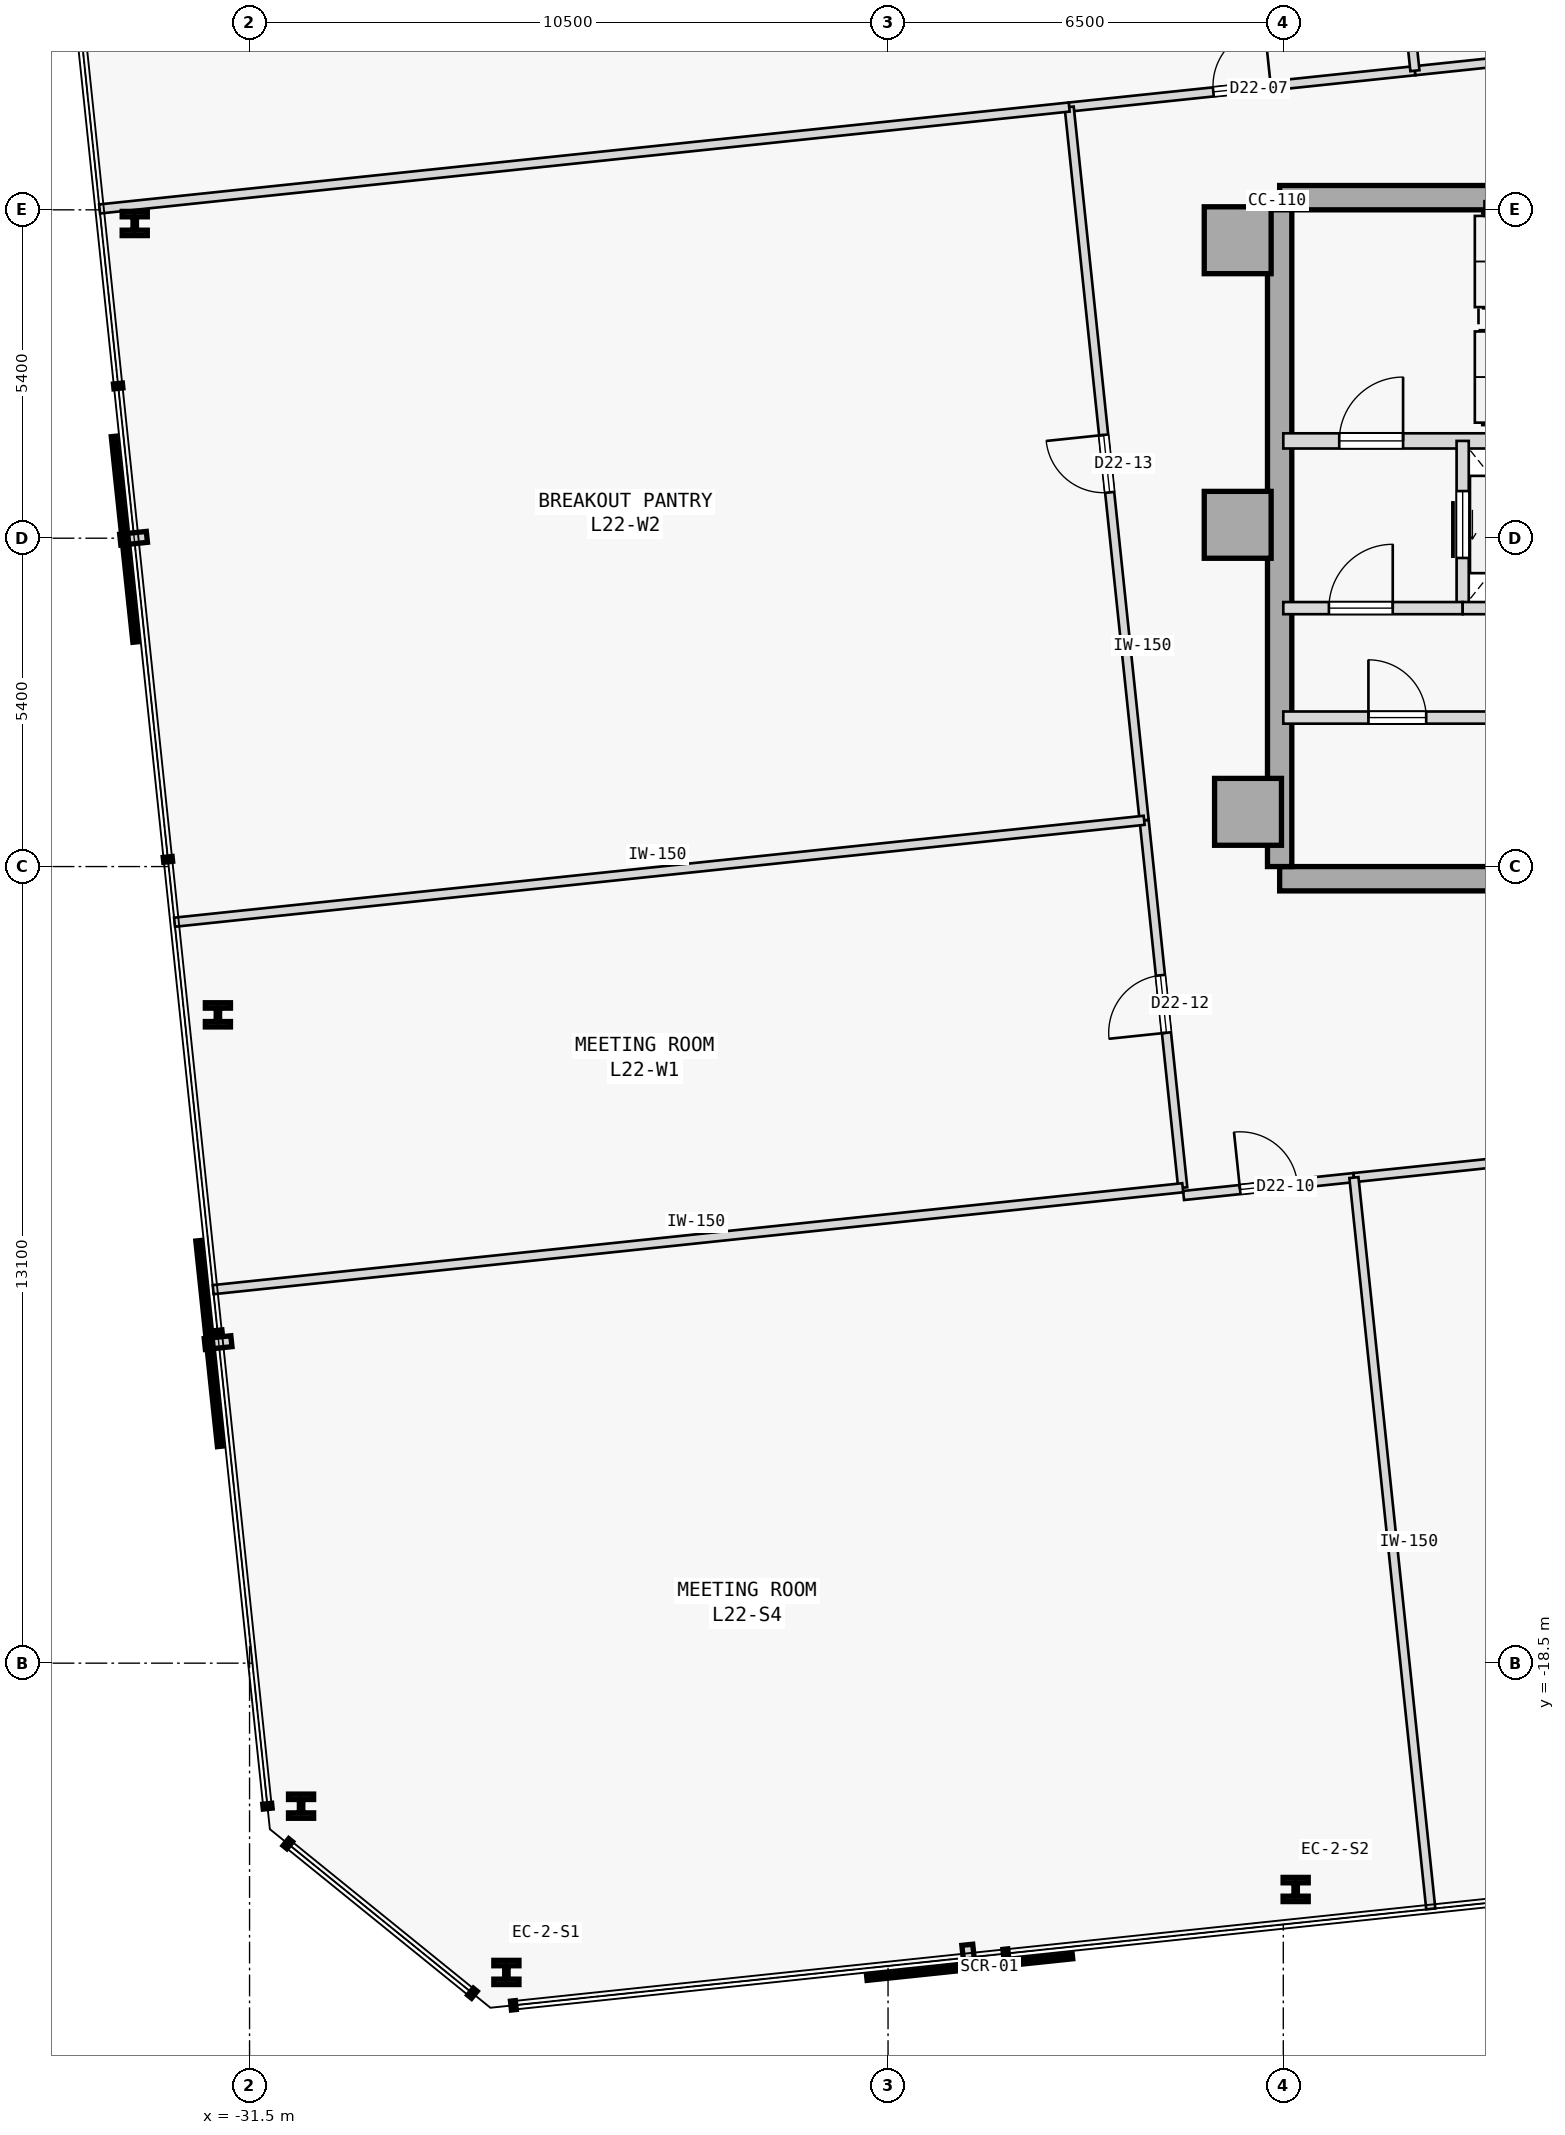
"""IFC4 building model, lengths in metres.
Left out: names, types, materials, properties, quantities, classifications, styles, units other than length and angle.
Written with IfcOpenShell. Run it as: python <this file> out.ifc"""

import sys

from ifc_helpers import new_model, si_unit, direction, frame, frame_2d, origin, origin_2d, place, context, subcontext, project, spatial, rectangle, i_section, extrude, element, fill, save


model = new_model("IFC4")
c1 = context("Model", 3, precision=1e-05, world=origin(), true_north=direction((0.0, 1.0)))
c2 = subcontext(c1, "Body", "Model", "MODEL_VIEW")
j1 = project(units=[si_unit("LENGTHUNIT", "METRE"), si_unit("PLANEANGLEUNIT", "RADIAN")], contexts=[c1])
p1 = place(None, origin())
s1 = spatial("IfcSite", under=j1, at=p1, CompositionType="ELEMENT")
p2 = place(p1, origin())
s2 = spatial("IfcBuilding", under=s1, at=p2, CompositionType="ELEMENT")
p3 = place(p2, frame((0.0, 0.0, 91.1)))
s3 = spatial("IfcBuildingStorey", under=s2, at=p3, CompositionType="ELEMENT", Elevation=91.1)
for number, where, z_axis, x_axis in (
    (1, (-15.25, 4.9, 0.0), (0.0, 0.0, 1.0), (1.0, 0.0, 0.0)),
    (2, (-15.25, 0.22, 0.0), (0.0, 0.0, 1.0), (1.0, 0.0, 0.0)),
    (3, (-15.08, -4.5, 0.0), (0.0, 0.0, 1.0), (1.0, 0.0, 0.0)),
):
    element("IfcColumn", number, at=place(p3, frame(where, z_axis=z_axis, x_axis=x_axis)), inside=s3, PredefinedType="COLUMN", context=c2, shape_type="SweptSolid", body=[
        extrude(rectangle(XDim=1.1, YDim=1.1, at=origin_2d()), origin(), (0.0, 0.0, 1.0), 3.7),
    ])
p4 = place(p3, frame((-14.56, 5.6, 0.0), z_axis=(0.0, 0.0, 1.0), x_axis=(1.0, 0.0, 0.0)))
e4 = element("IfcWall", 4, at=p4, inside=s3, PredefinedType="SHEAR", context=c2, shape_type="SweptSolid", body=[
    extrude(rectangle(XDim=11.41, YDim=0.4, at=frame_2d((5.705, 0.0))), origin(), (0.0, 0.0, 1.0), 3.475),
])
p5 = place(p3, frame((-14.56, -5.6, 0.0), z_axis=(0.0, 0.0, 1.0), x_axis=(1.0, 0.0, 0.0)))
e5 = element("IfcWall", 5, at=p5, inside=s3, PredefinedType="SHEAR", context=c2, shape_type="SweptSolid", body=[
    extrude(rectangle(XDim=10.86, YDim=0.4, at=frame_2d((5.43, 0.0))), origin(), (0.0, 0.0, 1.0), 3.475),
])
p6 = place(p3, frame((-14.56, -5.4, 0.0), z_axis=(0.0, 0.0, 1.0), x_axis=(0.0, 1.0, 0.0)))
e6 = element("IfcWall", 6, at=p6, inside=s3, PredefinedType="SHEAR", context=c2, shape_type="SweptSolid", body=[
    extrude(rectangle(XDim=10.8, YDim=0.4, at=frame_2d((5.4, 0.0))), origin(), (0.0, 0.0, 1.0), 3.475),
])
for number, where, z_axis, x_axis in (
    (7, (-27.276, -23.586, 0.0), (0.0, 0.0, 1.0), (1.0, 0.0, 0.0)),
    (8, (-14.297, -22.222, 0.0), (0.0, 0.0, 1.0), (1.0, 0.0, 0.0)),
    (9, (-33.388, 5.175, 0.0), (0.0, 0.0, 1.0), (1.0, 0.0, 0.0)),
    (10, (-32.021, -7.838, 0.0), (0.0, 0.0, 1.0), (1.0, 0.0, 0.0)),
    (11, (-30.653, -20.852, 0.0), (0.0, 0.0, 1.0), (1.0, 0.0, 0.0)),
):
    element("IfcColumn", number, at=place(p3, frame(where, z_axis=z_axis, x_axis=x_axis)), inside=s3, PredefinedType="COLUMN", context=c2, shape_type="SweptSolid", body=[
        extrude(i_section(OverallWidth=0.413, OverallDepth=0.398, WebThickness=0.056, FlangeThickness=0.089, FilletRadius=0.015, at=origin_2d()), origin(), (0.0, 0.0, 1.0), 3.7),
    ])
p7 = place(p3, frame((-14.5, 1.6, 0.0), z_axis=(0.0, 0.0, 1.0), x_axis=(1.0, 0.0, 0.0)))
e12 = element("IfcWall", 12, at=p7, inside=s3, PredefinedType="STANDARD", context=c2, shape_type="SweptSolid", body=[
    extrude(rectangle(XDim=3.6, YDim=0.25, at=frame_2d((1.8, 0.0))), origin(), (0.0, 0.0, 1.0), 3.475),
])
p8 = place(p7, frame((0.92, 0.0, 0.0)))
e13 = element("IfcOpeningElement", 13, at=p8, cuts=e12, PredefinedType="OPENING", context=c2, shape_type="SweptSolid", body=[
    extrude(rectangle(XDim=1.05, YDim=2.15, at=frame_2d((0.525, 1.075))), frame((0.0, 0.135, 0.0), z_axis=(0.0, -1.0, 0.0), x_axis=(1.0, 0.0, 0.0)), (0.0, 0.0, 1.0), 0.27),
])
p9 = place(p3, frame((-11.55, -1.15, 0.0), z_axis=(0.0, 0.0, 1.0), x_axis=(0.0, 1.0, 0.0)))
e14 = element("IfcWall", 14, at=p9, inside=s3, PredefinedType="STANDARD", context=c2, shape_type="SweptSolid", body=[
    extrude(rectangle(XDim=2.75, YDim=0.2, at=frame_2d((1.375, 0.0))), origin(), (0.0, 0.0, 1.0), 3.475),
])
p10 = place(p9, frame((0.825, 0.0, 0.0)))
e15 = element("IfcOpeningElement", 15, at=p10, cuts=e14, PredefinedType="OPENING", context=c2, shape_type="SweptSolid", body=[
    extrude(rectangle(XDim=1.1, YDim=2.15, at=frame_2d((0.55, 1.075))), frame((0.0, 0.11, 0.0), z_axis=(0.0, -1.0, 0.0), x_axis=(1.0, 0.0, 0.0)), (0.0, 0.0, 1.0), 0.22),
])
p11 = place(p3, frame((-14.5, -1.15, 0.0), z_axis=(0.0, 0.0, 1.0), x_axis=(1.0, 0.0, 0.0)))
e16 = element("IfcWall", 16, at=p11, inside=s3, PredefinedType="STANDARD", context=c2, shape_type="SweptSolid", body=[
    extrude(rectangle(XDim=2.95, YDim=0.2, at=frame_2d((1.475, 0.0))), origin(), (0.0, 0.0, 1.0), 3.475),
])
p12 = place(p11, frame((0.75, 0.0, 0.0)))
e17 = element("IfcOpeningElement", 17, at=p12, cuts=e16, PredefinedType="OPENING", context=c2, shape_type="SweptSolid", body=[
    extrude(rectangle(XDim=1.05, YDim=2.18, at=frame_2d((0.525, 1.09))), frame((0.0, 0.11, 0.0), z_axis=(0.0, -1.0, 0.0), x_axis=(1.0, 0.0, 0.0)), (0.0, 0.0, 1.0), 0.22),
])
p13 = place(p3, frame((-11.55, -1.15, 0.0), z_axis=(0.0, 0.0, 1.0), x_axis=(1.0, 0.0, 0.0)))
e18 = element("IfcWall", 18, at=p13, inside=s3, PredefinedType="STANDARD", context=c2, shape_type="SweptSolid", body=[
    extrude(rectangle(XDim=2.2, YDim=0.2, at=frame_2d((1.1, 0.0))), origin(), (0.0, 0.0, 1.0), 3.475),
])
p14 = place(p3, frame((-14.5, -2.95, 0.0), z_axis=(0.0, 0.0, 1.0), x_axis=(1.0, 0.0, 0.0)))
e19 = element("IfcWall", 19, at=p14, inside=s3, PredefinedType="STANDARD", context=c2, shape_type="SweptSolid", body=[
    extrude(rectangle(XDim=10.8, YDim=0.2, at=frame_2d((5.4, 0.0))), origin(), (0.0, 0.0, 1.0), 3.475),
])
p15 = place(p14, frame((4.85, 0.0, 0.0)))
e20 = element("IfcOpeningElement", 20, at=p15, cuts=e19, PredefinedType="OPENING", context=c2, shape_type="SweptSolid", body=[
    extrude(rectangle(XDim=1.1, YDim=2.15, at=frame_2d((0.55, 1.075))), frame((0.0, 0.11, 0.0), z_axis=(0.0, -1.0, 0.0), x_axis=(1.0, 0.0, 0.0)), (0.0, 0.0, 1.0), 0.22),
])
p16 = place(p14, frame((7.01, 0.0, 0.0)))
e21 = element("IfcOpeningElement", 21, at=p16, cuts=e19, PredefinedType="OPENING", context=c2, shape_type="SweptSolid", body=[
    extrude(rectangle(XDim=1.1, YDim=2.15, at=frame_2d((0.55, 1.075))), frame((0.0, 0.11, 0.0), z_axis=(0.0, -1.0, 0.0), x_axis=(1.0, 0.0, 0.0)), (0.0, 0.0, 1.0), 0.22),
])
p17 = place(p14, frame((1.4, 0.0, 0.0)))
e22 = element("IfcOpeningElement", 22, at=p17, cuts=e19, PredefinedType="OPENING", context=c2, shape_type="SweptSolid", body=[
    extrude(rectangle(XDim=0.95, YDim=2.15, at=frame_2d((0.475, 1.075))), frame((0.0, 0.11, 0.0), z_axis=(0.0, -1.0, 0.0), x_axis=(1.0, 0.0, 0.0)), (0.0, 0.0, 1.0), 0.22),
])
p18 = place(p3, frame((-18.021, 7.09, 0.0), z_axis=(0.0, 0.0, 1.0), x_axis=(0.994520418841, 0.104542510534, 0.0)))
e23 = element("IfcWall", 23, at=p18, inside=s3, PredefinedType="PARTITIONING", context=c2, shape_type="SweptSolid", body=[
    extrude(rectangle(XDim=5.717, YDim=0.15, at=frame_2d((2.858, 0.0))), origin(), (0.0, 0.0, 1.0), 3.475),
])
p19 = place(p18, frame((2.384, 0.0, 0.0)))
e24 = element("IfcOpeningElement", 24, at=p19, cuts=e23, PredefinedType="OPENING", context=c2, shape_type="SweptSolid", body=[
    extrude(rectangle(XDim=0.95, YDim=2.15, at=frame_2d((0.475, 1.075))), frame((0.0, 0.085, 0.0), z_axis=(0.0, -1.0, 0.0), x_axis=(1.0, 0.0, 0.0)), (0.0, 0.0, 1.0), 0.17),
])
p20 = place(p3, frame((-12.336, 7.688, 0.0), z_axis=(0.0, 0.0, 1.0), x_axis=(0.994522386381, 0.104523791488, 0.0)))
e25 = element("IfcWall", 25, at=p20, inside=s3, PredefinedType="PARTITIONING", context=c2, shape_type="SweptSolid", body=[
    extrude(rectangle(XDim=27.55, YDim=0.15, at=frame_2d((13.775, 0.0))), origin(), (0.0, 0.0, 1.0), 3.475),
])
p21 = place(p20, frame((13.3, 0.0, 0.0)))
e26 = element("IfcOpeningElement", 26, at=p21, cuts=e25, PredefinedType="OPENING", context=c2, shape_type="SweptSolid", body=[
    extrude(rectangle(XDim=0.95, YDim=2.15, at=frame_2d((0.475, 1.075))), frame((0.0, 0.085, 0.0), z_axis=(0.0, -1.0, 0.0), x_axis=(1.0, 0.0, 0.0)), (0.0, 0.0, 1.0), 0.17),
])
p22 = place(p3, frame((-16.14, -10.809, 0.0), z_axis=(0.0, 0.0, 1.0), x_axis=(0.994522535937, 0.104522368483, 0.0)))
e27 = element("IfcWall", 27, at=p22, inside=s3, PredefinedType="PARTITIONING", context=c2, shape_type="SweptSolid", body=[
    extrude(rectangle(XDim=2.817, YDim=0.15, at=frame_2d((1.408, 0.0))), origin(), (0.0, 0.0, 1.0), 3.475),
])
p23 = place(p22, frame((0.934, 0.0, 0.0)))
e28 = element("IfcOpeningElement", 28, at=p23, cuts=e27, PredefinedType="OPENING", context=c2, shape_type="SweptSolid", body=[
    extrude(rectangle(XDim=0.95, YDim=2.15, at=frame_2d((0.475, 1.075))), frame((0.0, 0.085, 0.0), z_axis=(0.0, -1.0, 0.0), x_axis=(1.0, 0.0, 0.0)), (0.0, 0.0, 1.0), 0.17),
])
p24 = place(p3, frame((-13.338, -10.515, 0.0), z_axis=(0.0, 0.0, 1.0), x_axis=(0.994522458216, 0.104523107989, 0.0)))
e29 = element("IfcWall", 29, at=p24, inside=s3, PredefinedType="PARTITIONING", context=c2, shape_type="SweptSolid", body=[
    extrude(rectangle(XDim=31.757, YDim=0.15, at=frame_2d((15.878, 0.0))), origin(), (0.0, 0.0, 1.0), 3.475),
])
p25 = place(p24, frame((15.404, 0.0, 0.0)))
e30 = element("IfcOpeningElement", 30, at=p25, cuts=e29, PredefinedType="OPENING", context=c2, shape_type="SweptSolid", body=[
    extrude(rectangle(XDim=0.95, YDim=2.15, at=frame_2d((0.475, 1.075))), frame((0.0, 0.085, 0.0), z_axis=(0.0, -1.0, 0.0), x_axis=(1.0, 0.0, 0.0)), (0.0, 0.0, 1.0), 0.17),
])
p26 = place(p3, frame((-16.153, -10.682, 0.0), z_axis=(0.0, 0.0, 1.0), x_axis=(-0.104550920346, 0.994519534778, 0.0)))
e31 = element("IfcWall", 31, at=p26, inside=s3, PredefinedType="PARTITIONING", context=c2, shape_type="SweptSolid", body=[
    extrude(rectangle(XDim=6.076, YDim=0.15, at=frame_2d((3.038, 0.0))), origin(), (0.0, 0.0, 1.0), 3.475),
])
p27 = place(p26, frame((2.563, 0.0, 0.0)))
e32 = element("IfcOpeningElement", 32, at=p27, cuts=e31, PredefinedType="OPENING", context=c2, shape_type="SweptSolid", body=[
    extrude(rectangle(XDim=0.95, YDim=2.15, at=frame_2d((0.475, 1.075))), frame((0.0, 0.085, 0.0), z_axis=(0.0, -1.0, 0.0), x_axis=(1.0, 0.0, 0.0)), (0.0, 0.0, 1.0), 0.17),
])
p28 = place(p3, frame((-16.789, -4.639, 0.0), z_axis=(0.0, 0.0, 1.0), x_axis=(-0.104515608009, 0.994523246426, 0.0)))
e33 = element("IfcWall", 33, at=p28, inside=s3, PredefinedType="PARTITIONING", context=c2, shape_type="SweptSolid", body=[
    extrude(rectangle(XDim=11.794, YDim=0.15, at=frame_2d((5.897, 0.0))), origin(), (0.0, 0.0, 1.0), 3.475),
])
p29 = place(p28, frame((5.422, 0.0, 0.0)))
e34 = element("IfcOpeningElement", 34, at=p29, cuts=e33, PredefinedType="OPENING", context=c2, shape_type="SweptSolid", body=[
    extrude(rectangle(XDim=0.95, YDim=2.15, at=frame_2d((0.475, 1.075))), frame((0.0, 0.085, 0.0), z_axis=(0.0, -1.0, 0.0), x_axis=(1.0, 0.0, 0.0)), (0.0, 0.0, 1.0), 0.17),
])
p30 = place(p3, frame((-12.336, 7.688, 0.0), z_axis=(0.0, 0.0, 1.0), x_axis=(-0.104521364336, 0.99452264147, 0.0)))
e35 = element("IfcWall", 35, at=p30, inside=s3, PredefinedType="PARTITIONING", context=c2, shape_type="SweptSolid", body=[
    extrude(rectangle(XDim=16.409, YDim=0.15, at=frame_2d((8.205, 0.0))), origin(), (0.0, 0.0, 1.0), 3.025),
])
p31 = place(p3, frame((-33.967, 5.414, 0.0), z_axis=(0.0, 0.0, 1.0), x_axis=(0.994521211213, 0.104534972363, 0.0)))
e36 = element("IfcWall", 36, at=p31, inside=s3, PredefinedType="PARTITIONING", context=c2, shape_type="SweptSolid", body=[
    extrude(rectangle(XDim=16.033, YDim=0.15, at=frame_2d((8.017, 0.0))), origin(), (0.0, 0.0, 1.0), 3.475),
])
p32 = place(p3, frame((-12.074, -22.542, 0.0), z_axis=(0.0, 0.0, 1.0), x_axis=(-0.104515587229, 0.99452324861, 0.0)))
e37 = element("IfcWall", 37, at=p32, inside=s3, PredefinedType="PARTITIONING", context=c2, shape_type="SweptSolid", body=[
    extrude(rectangle(XDim=12.093, YDim=0.15, at=frame_2d((6.046, 0.0))), origin(), (0.0, 0.0, 1.0), 3.475),
])
p33 = place(p3, frame((-32.099, -12.358, 0.0), z_axis=(0.0, 0.0, 1.0), x_axis=(0.994522794159, 0.104519911488, 0.0)))
e38 = element("IfcWall", 38, at=p33, inside=s3, PredefinedType="PARTITIONING", context=c2, shape_type="SweptSolid", body=[
    extrude(rectangle(XDim=16.033, YDim=0.15, at=frame_2d((8.017, 0.0))), origin(), (0.0, 0.0, 1.0), 3.475),
])
p34 = place(p3, frame((-32.734, -6.315, 0.0), z_axis=(0.0, 0.0, 1.0), x_axis=(0.994522627807, 0.104521494347, 0.0)))
e39 = element("IfcWall", 39, at=p34, inside=s3, PredefinedType="PARTITIONING", context=c2, shape_type="SweptSolid", body=[
    extrude(rectangle(XDim=16.033, YDim=0.15, at=frame_2d((8.017, 0.0))), origin(), (0.0, 0.0, 1.0), 3.475),
])
p35 = place(p8, origin())
e40 = element("IfcDoor", 40, at=p35, inside=s3, OperationType="SINGLE_SWING_RIGHT", PredefinedType="DOOR", context=c2, shape_type="SweptSolid", body=[
    extrude(rectangle(XDim=1.05, YDim=2.15, at=frame_2d((0.525, 1.075))), frame((0.0, 0.025, 0.0), z_axis=(0.0, -1.0, 0.0), x_axis=(1.0, 0.0, 0.0)), (0.0, 0.0, 1.0), 0.05),
])
fill(e13, e40)
p36 = place(p12, origin())
e41 = element("IfcDoor", 41, at=p36, inside=s3, OperationType="SINGLE_SWING_RIGHT", PredefinedType="DOOR", context=c2, shape_type="SweptSolid", body=[
    extrude(rectangle(XDim=1.05, YDim=2.18, at=frame_2d((0.525, 1.09))), frame((0.0, 0.025, 0.0), z_axis=(0.0, -1.0, 0.0), x_axis=(1.0, 0.0, 0.0)), (0.0, 0.0, 1.0), 0.05),
])
fill(e17, e41)
p37 = place(p10, origin())
e42 = element("IfcDoor", 42, at=p37, inside=s3, OperationType="SLIDING_TO_RIGHT", PredefinedType="DOOR", context=c2, shape_type="SweptSolid", body=[
    extrude(rectangle(XDim=1.1, YDim=2.15, at=frame_2d((0.55, 1.075))), frame((0.0, 0.025, 0.0), z_axis=(0.0, -1.0, 0.0), x_axis=(1.0, 0.0, 0.0)), (0.0, 0.0, 1.0), 0.05),
])
fill(e15, e42)
p38 = place(p17, origin())
e43 = element("IfcDoor", 43, at=p38, inside=s3, OperationType="SINGLE_SWING_LEFT", PredefinedType="DOOR", context=c2, shape_type="SweptSolid", body=[
    extrude(rectangle(XDim=0.95, YDim=2.15, at=frame_2d((0.475, 1.075))), frame((0.0, 0.025, 0.0), z_axis=(0.0, -1.0, 0.0), x_axis=(1.0, 0.0, 0.0)), (0.0, 0.0, 1.0), 0.05),
])
fill(e22, e43)
p39 = place(p19, origin())
e44 = element("IfcDoor", 44, at=p39, inside=s3, OperationType="SINGLE_SWING_RIGHT", PredefinedType="DOOR", context=c2, shape_type="SweptSolid", body=[
    extrude(rectangle(XDim=0.95, YDim=2.15, at=frame_2d((0.475, 1.075))), frame((0.0, 0.025, 0.0), z_axis=(0.0, -1.0, 0.0), x_axis=(1.0, 0.0, 0.0)), (0.0, 0.0, 1.0), 0.05),
])
fill(e24, e44)
p40 = place(p23, origin())
e45 = element("IfcDoor", 45, at=p40, inside=s3, OperationType="SINGLE_SWING_LEFT", PredefinedType="DOOR", context=c2, shape_type="SweptSolid", body=[
    extrude(rectangle(XDim=0.95, YDim=2.15, at=frame_2d((0.475, 1.075))), frame((0.0, 0.025, 0.0), z_axis=(0.0, -1.0, 0.0), x_axis=(1.0, 0.0, 0.0)), (0.0, 0.0, 1.0), 0.05),
])
fill(e28, e45)
p41 = place(p27, origin())
e46 = element("IfcDoor", 46, at=p41, inside=s3, OperationType="SINGLE_SWING_LEFT", PredefinedType="DOOR", context=c2, shape_type="SweptSolid", body=[
    extrude(rectangle(XDim=0.95, YDim=2.15, at=frame_2d((0.475, 1.075))), frame((0.0, 0.025, 0.0), z_axis=(0.0, -1.0, 0.0), x_axis=(1.0, 0.0, 0.0)), (0.0, 0.0, 1.0), 0.05),
])
fill(e32, e46)
p42 = place(p29, origin())
e47 = element("IfcDoor", 47, at=p42, inside=s3, OperationType="SINGLE_SWING_RIGHT", PredefinedType="DOOR", context=c2, shape_type="SweptSolid", body=[
    extrude(rectangle(XDim=0.95, YDim=2.15, at=frame_2d((0.475, 1.075))), frame((0.0, 0.025, 0.0), z_axis=(0.0, -1.0, 0.0), x_axis=(1.0, 0.0, 0.0)), (0.0, 0.0, 1.0), 0.05),
])
fill(e34, e47)
save(model, sys.argv[1])
